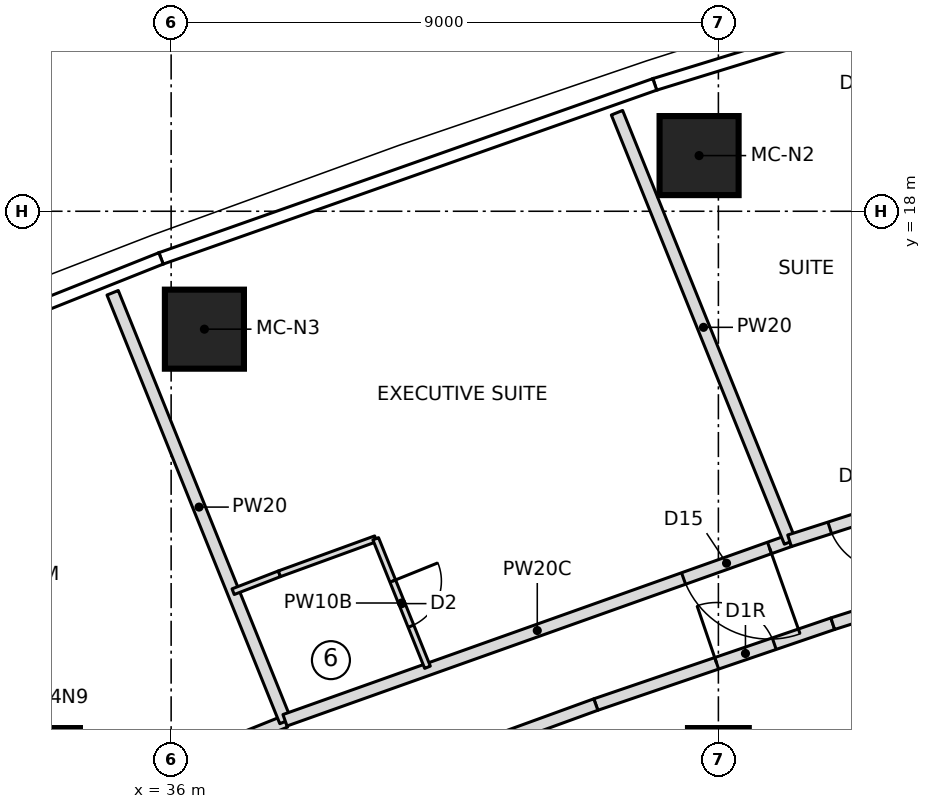
"""IFC4 building model, lengths in metres.
Left out: names, types, materials, properties, quantities, classifications, styles, units other than length and angle.
Written with IfcOpenShell. Run it as: python <this file> out.ifc"""

import sys

from ifc_helpers import new_model, si_unit, direction, frame, frame_2d, origin, origin_2d, place, context, subcontext, project, spatial, rectangle, extrude, element, fill, save


model = new_model("IFC4")
c1 = context("Model", 3, precision=1e-05, world=origin(), true_north=direction((0.0, 1.0)))
c2 = subcontext(c1, "Body", "Model", "MODEL_VIEW")
j1 = project(units=[si_unit("LENGTHUNIT", "METRE"), si_unit("PLANEANGLEUNIT", "RADIAN")], contexts=[c1])
p1 = place(None, origin())
s1 = spatial("IfcSite", under=j1, at=p1, CompositionType="ELEMENT")
p2 = place(p1, origin())
s2 = spatial("IfcBuilding", under=s1, at=p2, CompositionType="ELEMENT")
p3 = place(p2, frame((0.0, 0.0, 196.8)))
s3 = spatial("IfcBuildingStorey", under=s2, at=p3, CompositionType="ELEMENT", Elevation=196.8)
for number, where, z_axis, x_axis in (
    (1, (44.683, 18.916, 0.0), (0.0, 0.0, 1.0), (1.0, 0.0, 0.0)),
    (2, (36.547, 16.061, 0.0), (0.0, 0.0, 1.0), (1.0, 0.0, 0.0)),
):
    element("IfcColumn", number, at=place(p3, frame(where, z_axis=z_axis, x_axis=x_axis)), inside=s3, PredefinedType="COLUMN", context=c2, shape_type="SweptSolid", body=[
        extrude(rectangle(XDim=1.3, YDim=1.3, at=origin_2d()), origin(), (0.0, 0.0, 1.0), 3.55),
    ])
for number, where, z_axis, x_axis in (
    (3, (34.0, 9.0, 0.0), (0.0, 0.0, 1.0), (1.0, 0.0, 0.0)),
    (4, (45.0, 9.0, 0.0), (0.0, 0.0, 1.0), (1.0, 0.0, 0.0)),
):
    element("IfcColumn", number, at=place(p3, frame(where, z_axis=z_axis, x_axis=x_axis)), inside=s3, PredefinedType="COLUMN", context=c2, shape_type="SweptSolid", body=[
        extrude(rectangle(XDim=1.0, YDim=1.0, at=origin_2d()), origin(), (0.0, 0.0, 1.0), 3.55),
    ])
p4 = place(p3, frame((29.714, 6.329, 0.0), z_axis=(0.0, 0.0, 1.0), x_axis=(0.927886226391, 0.372863448026, 0.0)))
e5 = element("IfcWall", 5, at=p4, inside=s3, PredefinedType="PARTITIONING", context=c2, shape_type="SweptSolid", body=[
    extrude(rectangle(XDim=8.8, YDim=0.2, at=frame_2d((4.4, 0.0))), origin(), (0.0, 0.0, 1.0), 3.25),
])
p5 = place(p4, frame((3.25, 0.0, 0.0)))
e6 = element("IfcOpeningElement", 6, at=p5, cuts=e5, PredefinedType="OPENING", context=c2, shape_type="SweptSolid", body=[
    extrude(rectangle(XDim=1.0, YDim=2.1, at=frame_2d((0.5, 1.05))), frame((0.0, 0.11, 0.0), z_axis=(0.0, -1.0, 0.0), x_axis=(1.0, 0.0, 0.0)), (0.0, 0.0, 1.0), 0.22),
])
p6 = place(p3, frame((37.88, 9.61, 0.0), z_axis=(0.0, 0.0, 1.0), x_axis=(-0.373892577014, 0.927472016211, 0.0)))
e7 = element("IfcWall", 7, at=p6, inside=s3, PredefinedType="PARTITIONING", context=c2, shape_type="SweptSolid", body=[
    extrude(rectangle(XDim=7.601, YDim=0.2, at=frame_2d((3.8, 0.0))), origin(), (0.0, 0.0, 1.0), 3.25),
])
p7 = place(p3, frame((46.17, 12.58, 0.0), z_axis=(0.0, 0.0, 1.0), x_axis=(-0.942170738702, -0.335133255786, 0.0)))
e8 = element("IfcWall", 8, at=p7, inside=s3, PredefinedType="PARTITIONING", context=c2, shape_type="SweptSolid", body=[
    extrude(rectangle(XDim=8.807, YDim=0.2, at=frame_2d((4.404, 0.0))), origin(), (0.0, 0.0, 1.0), 3.25),
])
p8 = place(p7, frame((0.35, 0.0, 0.0)))
e9 = element("IfcOpeningElement", 9, at=p8, cuts=e8, PredefinedType="OPENING", context=c2, shape_type="SweptSolid", body=[
    extrude(rectangle(XDim=1.5, YDim=2.1, at=frame_2d((0.75, 1.05))), frame((0.0, 0.11, 0.0), z_axis=(0.0, -1.0, 0.0), x_axis=(1.0, 0.0, 0.0)), (0.0, 0.0, 1.0), 0.22),
])
p9 = place(p3, frame((37.02, 11.743, 0.0), z_axis=(0.0, 0.0, 1.0), x_axis=(0.9326493613, 0.360784102846, 0.0)))
e10 = element("IfcWall", 10, at=p9, inside=s3, PredefinedType="PARTITIONING", context=c2, shape_type="SweptSolid", body=[
    extrude(rectangle(XDim=0.815, YDim=0.1, at=frame_2d((0.408, 0.0))), origin(), (0.0, 0.0, 1.0), 3.25),
])
p10 = place(p3, frame((37.78, 12.037, 0.0), z_axis=(0.0, 0.0, 1.0), x_axis=(0.939759586286, 0.341836101053, 0.0)))
e11 = element("IfcWall", 11, at=p10, inside=s3, PredefinedType="PARTITIONING", context=c2, shape_type="SweptSolid", body=[
    extrude(rectangle(XDim=1.686, YDim=0.1, at=frame_2d((0.843, 0.0))), origin(), (0.0, 0.0, 1.0), 3.25),
])
p11 = place(p3, frame((39.364, 12.614, 0.0), z_axis=(0.0, 0.0, 1.0), x_axis=(0.373883593317, -0.927475637765, 0.0)))
e12 = element("IfcWall", 12, at=p11, inside=s3, PredefinedType="PARTITIONING", context=c2, shape_type="SweptSolid", body=[
    extrude(rectangle(XDim=2.278, YDim=0.1, at=frame_2d((1.139, 0.0))), origin(), (0.0, 0.0, 1.0), 3.25),
])
p12 = place(p11, frame((0.75, 0.0, 0.0)))
e13 = element("IfcOpeningElement", 13, at=p12, cuts=e12, PredefinedType="OPENING", context=c2, shape_type="SweptSolid", body=[
    extrude(rectangle(XDim=0.8, YDim=2.1, at=frame_2d((0.4, 1.05))), frame((0.0, 0.06, 0.0), z_axis=(0.0, -1.0, 0.0), x_axis=(1.0, 0.0, 0.0)), (0.0, 0.0, 1.0), 0.12),
])
p13 = place(p3, frame((46.178, 12.562, 0.0), z_axis=(0.0, 0.0, 1.0), x_axis=(-0.373905590149, 0.927466770108, 0.0)))
e14 = element("IfcWall", 14, at=p13, inside=s3, PredefinedType="PARTITIONING", context=c2, shape_type="SweptSolid", body=[
    extrude(rectangle(XDim=7.611, YDim=0.2, at=frame_2d((3.806, 0.0))), origin(), (0.0, 0.0, 1.0), 3.25),
])
p14 = place(p3, frame((42.984, 9.887, 0.0), z_axis=(0.0, 0.0, 1.0), x_axis=(0.946436071896, 0.322891253852, 0.0)))
e15 = element("IfcWall", 15, at=p14, inside=s3, PredefinedType="PARTITIONING", context=c2, shape_type="SweptSolid", body=[
    extrude(rectangle(XDim=4.117, YDim=0.2, at=frame_2d((2.059, 0.0))), origin(), (0.0, 0.0, 1.0), 3.25),
])
p15 = place(p14, frame((2.1, 0.0, 0.0)))
e16 = element("IfcOpeningElement", 16, at=p15, cuts=e15, PredefinedType="OPENING", context=c2, shape_type="SweptSolid", body=[
    extrude(rectangle(XDim=1.0, YDim=2.1, at=frame_2d((0.5, 1.05))), frame((0.0, 0.11, 0.0), z_axis=(0.0, -1.0, 0.0), x_axis=(1.0, 0.0, 0.0)), (0.0, 0.0, 1.0), 0.22),
])
p16 = place(p3, frame((40.19, 8.871, 0.0), z_axis=(0.0, 0.0, 1.0), x_axis=(0.939726274687, 0.341927665833, 0.0)))
e17 = element("IfcWall", 17, at=p16, inside=s3, PredefinedType="PARTITIONING", context=c2, shape_type="SweptSolid", body=[
    extrude(rectangle(XDim=2.973, YDim=0.2, at=frame_2d((1.487, 0.0))), origin(), (0.0, 0.0, 1.0), 3.25),
])
p17 = place(p3, frame((48.15, 13.216, 0.0), z_axis=(0.0, 0.0, 1.0), x_axis=(-0.952101841283, -0.305781104428, 0.0)))
e18 = element("IfcWall", 18, at=p17, inside=s3, PredefinedType="PARTITIONING", context=c2, shape_type="SweptSolid", body=[
    extrude(rectangle(XDim=2.079, YDim=0.2, at=frame_2d((1.04, 0.0))), origin(), (0.0, 0.0, 1.0), 3.25),
])
p18 = place(p17, frame((0.385, 0.0, 0.0)))
e19 = element("IfcOpeningElement", 19, at=p18, cuts=e18, PredefinedType="OPENING", context=c2, shape_type="SweptSolid", body=[
    extrude(rectangle(XDim=1.0, YDim=2.1, at=frame_2d((0.5, 1.05))), frame((0.0, 0.11, 0.0), z_axis=(0.0, -1.0, 0.0), x_axis=(1.0, 0.0, 0.0)), (0.0, 0.0, 1.0), 0.22),
])
p19 = place(p3, frame((46.881, 11.217, 0.0), z_axis=(0.0, 0.0, 1.0), x_axis=(0.952761948983, 0.303718074157, 0.0)))
e20 = element("IfcWall", 20, at=p19, inside=s3, PredefinedType="PARTITIONING", context=c2, shape_type="SweptSolid", body=[
    extrude(rectangle(XDim=1.332, YDim=0.2, at=frame_2d((0.666, 0.0))), origin(), (0.0, 0.0, 1.0), 3.25),
])
p20 = place(p12, origin())
e21 = element("IfcDoor", 21, at=p20, inside=s3, OperationType="SINGLE_SWING_LEFT", PredefinedType="DOOR", context=c2, shape_type="SweptSolid", body=[
    extrude(rectangle(XDim=0.8, YDim=2.1, at=frame_2d((0.4, 1.05))), frame((0.0, 0.025, 0.0), z_axis=(0.0, -1.0, 0.0), x_axis=(1.0, 0.0, 0.0)), (0.0, 0.0, 1.0), 0.05),
])
fill(e13, e21)
p21 = place(p8, origin())
e22 = element("IfcDoor", 22, at=p21, inside=s3, OperationType="DOUBLE_DOOR_SINGLE_SWING", PredefinedType="DOOR", context=c2, shape_type="SweptSolid", body=[
    extrude(rectangle(XDim=1.5, YDim=2.1, at=frame_2d((0.75, 1.05))), frame((0.0, 0.025, 0.0), z_axis=(0.0, -1.0, 0.0), x_axis=(1.0, 0.0, 0.0)), (0.0, 0.0, 1.0), 0.05),
])
fill(e9, e22)
p22 = place(p18, origin())
e23 = element("IfcDoor", 23, at=p22, inside=s3, OperationType="SINGLE_SWING_RIGHT", PredefinedType="DOOR", context=c2, shape_type="SweptSolid", body=[
    extrude(rectangle(XDim=1.0, YDim=2.1, at=frame_2d((0.5, 1.05))), frame((0.0, 0.025, 0.0), z_axis=(0.0, -1.0, 0.0), x_axis=(1.0, 0.0, 0.0)), (0.0, 0.0, 1.0), 0.05),
])
fill(e19, e23)
p23 = place(p15, origin())
e24 = element("IfcDoor", 24, at=p23, inside=s3, OperationType="SINGLE_SWING_RIGHT", PredefinedType="DOOR", context=c2, shape_type="SweptSolid", body=[
    extrude(rectangle(XDim=1.0, YDim=2.1, at=frame_2d((0.5, 1.05))), frame((0.0, 0.025, 0.0), z_axis=(0.0, -1.0, 0.0), x_axis=(1.0, 0.0, 0.0)), (0.0, 0.0, 1.0), 0.05),
])
fill(e16, e24)
save(model, sys.argv[1])
